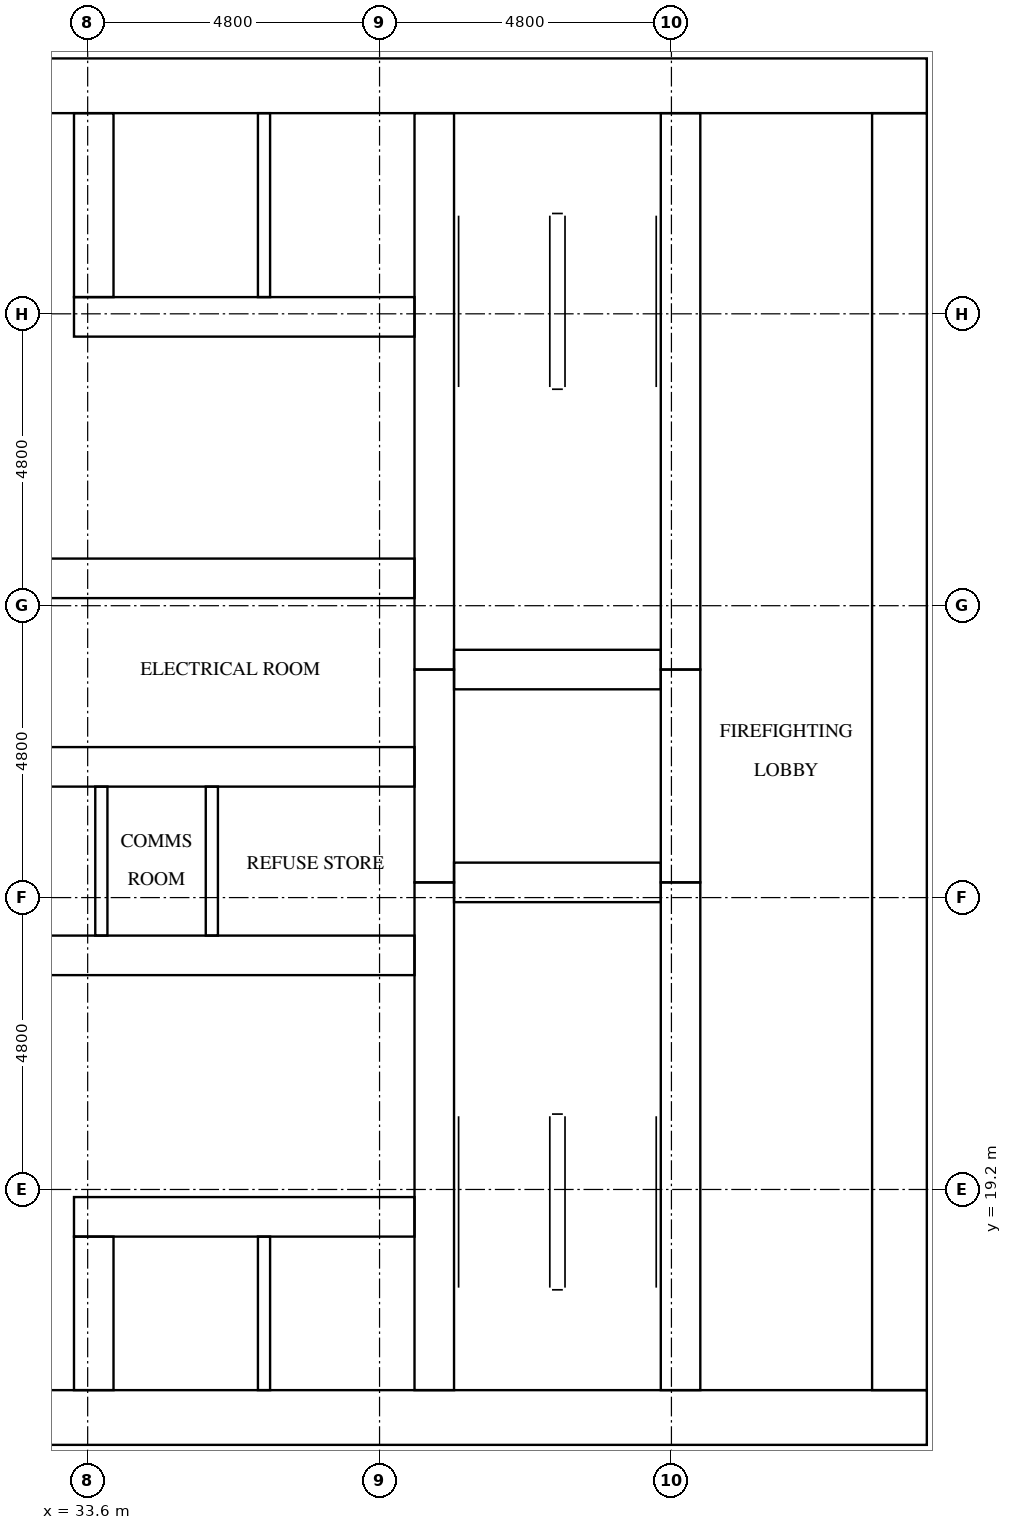
"""IFC4 building model, lengths in metres.
Left out: names, types, materials, properties, quantities, classifications, styles, units other than length and angle.
Written with IfcOpenShell. Run it as: python <this file> out.ifc"""

import sys

from ifc_helpers import new_model, si_unit, direction, frame, frame_2d, origin, place, context, subcontext, project, spatial, rectangle, extrude, element, fill, save


model = new_model("IFC4")
c1 = context("Model", 3, precision=1e-05, world=origin(), true_north=direction((0.0, 1.0)))
c2 = subcontext(c1, "Body", "Model", "MODEL_VIEW")
j1 = project(units=[si_unit("LENGTHUNIT", "METRE"), si_unit("PLANEANGLEUNIT", "RADIAN")], contexts=[c1])
p1 = place(None, origin())
s1 = spatial("IfcSite", under=j1, at=p1, CompositionType="ELEMENT")
p2 = place(p1, origin())
s2 = spatial("IfcBuilding", under=s1, at=p2, CompositionType="ELEMENT")
p3 = place(p2, frame((0.0, 0.0, 76.8)))
s3 = spatial("IfcBuildingStorey", under=s2, at=p3, CompositionType="ELEMENT", Elevation=76.8)
p4 = place(p3, frame((15.0, 15.45, 0.0), z_axis=(0.0, 0.0, 1.0), x_axis=(1.0, 0.0, 0.0)))
e1 = element("IfcWall", 1, at=p4, inside=s3, PredefinedType="SHEAR", context=c2, shape_type="SweptSolid", body=[
    extrude(rectangle(XDim=32.4, YDim=0.9, at=frame_2d((16.2, 0.0))), origin(), (0.0, 0.0, 1.0), 3.2),
])
p5 = place(p4, frame((15.3, 0.0, 0.0)))
e2 = element("IfcOpeningElement", 2, at=p5, cuts=e1, PredefinedType="OPENING", context=c2, shape_type="SweptSolid", body=[
    extrude(rectangle(XDim=1.8, YDim=2.1, at=frame_2d((0.9, 1.05))), frame((0.0, 0.46, 0.0), z_axis=(0.0, -1.0, 0.0), x_axis=(1.0, 0.0, 0.0)), (0.0, 0.0, 1.0), 0.92),
])
p6 = place(p3, frame((15.0, 37.35, 0.0), z_axis=(0.0, 0.0, 1.0), x_axis=(1.0, 0.0, 0.0)))
e3 = element("IfcWall", 3, at=p6, inside=s3, PredefinedType="SHEAR", context=c2, shape_type="SweptSolid", body=[
    extrude(rectangle(XDim=32.4, YDim=0.9, at=frame_2d((16.2, 0.0))), origin(), (0.0, 0.0, 1.0), 3.2),
])
p7 = place(p6, frame((15.3, 0.0, 0.0)))
e4 = element("IfcOpeningElement", 4, at=p7, cuts=e3, PredefinedType="OPENING", context=c2, shape_type="SweptSolid", body=[
    extrude(rectangle(XDim=1.8, YDim=2.1, at=frame_2d((0.9, 1.05))), frame((0.0, 0.46, 0.0), z_axis=(0.0, -1.0, 0.0), x_axis=(1.0, 0.0, 0.0)), (0.0, 0.0, 1.0), 0.92),
])
p8 = place(p6, frame((1.794, 0.0, 0.0)))
e5 = element("IfcOpeningElement", 5, at=p8, cuts=e3, PredefinedType="OPENING", context=c2, shape_type="SweptSolid", body=[
    extrude(rectangle(XDim=1.0, YDim=2.1, at=frame_2d((0.5, 1.05))), frame((0.0, 0.46, 0.0), z_axis=(0.0, -1.0, 0.0), x_axis=(1.0, 0.0, 0.0)), (0.0, 0.0, 1.0), 0.92),
])
p9 = place(p6, frame((5.331, 0.0, 0.0)))
e6 = element("IfcOpeningElement", 6, at=p9, cuts=e3, PredefinedType="OPENING", context=c2, shape_type="SweptSolid", body=[
    extrude(rectangle(XDim=1.0, YDim=2.1, at=frame_2d((0.5, 1.05))), frame((0.0, 0.46, 0.0), z_axis=(0.0, -1.0, 0.0), x_axis=(1.0, 0.0, 0.0)), (0.0, 0.0, 1.0), 0.92),
])
p10 = place(p3, frame((46.95, 15.9, 0.0), z_axis=(0.0, 0.0, 1.0), x_axis=(0.0, 1.0, 0.0)))
e7 = element("IfcWall", 7, at=p10, inside=s3, PredefinedType="SHEAR", context=c2, shape_type="SweptSolid", body=[
    extrude(rectangle(XDim=21.0, YDim=0.9, at=frame_2d((10.5, 0.0))), origin(), (0.0, 0.0, 1.0), 3.2),
])
p11 = place(p10, frame((10.2, 0.0, 0.0)))
e8 = element("IfcOpeningElement", 8, at=p11, cuts=e7, PredefinedType="OPENING", context=c2, shape_type="SweptSolid", body=[
    extrude(rectangle(XDim=1.2, YDim=2.1, at=frame_2d((0.6, 1.05))), frame((0.0, 0.46, 0.0), z_axis=(0.0, -1.0, 0.0), x_axis=(1.0, 0.0, 0.0)), (0.0, 0.0, 1.0), 0.92),
])
p12 = place(p3, frame((39.3, 15.9, 0.0), z_axis=(0.0, 0.0, 1.0), x_axis=(0.0, 1.0, 0.0)))
e9 = element("IfcWall", 9, at=p12, inside=s3, PredefinedType="SHEAR", context=c2, shape_type="SweptSolid", body=[
    extrude(rectangle(XDim=8.35, YDim=0.65, at=frame_2d((4.175, 0.0))), origin(), (0.0, 0.0, 1.0), 3.2),
])
p13 = place(p3, frame((39.3, 24.25, 0.0), z_axis=(0.0, 0.0, 1.0), x_axis=(0.0, 1.0, 0.0)))
e10 = element("IfcWall", 10, at=p13, inside=s3, PredefinedType="SHEAR", context=c2, shape_type="SweptSolid", body=[
    extrude(rectangle(XDim=3.5, YDim=0.65, at=frame_2d((1.75, 0.0))), origin(), (0.0, 0.0, 1.0), 3.2),
])
p14 = place(p3, frame((39.3, 27.75, 0.0), z_axis=(0.0, 0.0, 1.0), x_axis=(0.0, 1.0, 0.0)))
e11 = element("IfcWall", 11, at=p14, inside=s3, PredefinedType="SHEAR", context=c2, shape_type="SweptSolid", body=[
    extrude(rectangle(XDim=9.15, YDim=0.65, at=frame_2d((4.575, 0.0))), origin(), (0.0, 0.0, 1.0), 3.2),
])
p15 = place(p3, frame((43.35, 15.9, 0.0), z_axis=(0.0, 0.0, 1.0), x_axis=(0.0, 1.0, 0.0)))
e12 = element("IfcWall", 12, at=p15, inside=s3, PredefinedType="SHEAR", context=c2, shape_type="SweptSolid", body=[
    extrude(rectangle(XDim=8.35, YDim=0.65, at=frame_2d((4.175, 0.0))), origin(), (0.0, 0.0, 1.0), 3.2),
])
p16 = place(p15, frame((0.3, 0.0, 0.0)))
e13 = element("IfcOpeningElement", 13, at=p16, cuts=e12, PredefinedType="OPENING", context=c2, shape_type="SweptSolid", body=[
    extrude(rectangle(XDim=1.2, YDim=2.1, at=frame_2d((0.6, 1.05))), frame((0.0, 0.335, 0.0), z_axis=(0.0, -1.0, 0.0), x_axis=(1.0, 0.0, 0.0)), (0.0, 0.0, 1.0), 0.67),
])
p17 = place(p3, frame((43.35, 24.25, 0.0), z_axis=(0.0, 0.0, 1.0), x_axis=(0.0, 1.0, 0.0)))
e14 = element("IfcWall", 14, at=p17, inside=s3, PredefinedType="SHEAR", context=c2, shape_type="SweptSolid", body=[
    extrude(rectangle(XDim=3.5, YDim=0.65, at=frame_2d((1.75, 0.0))), origin(), (0.0, 0.0, 1.0), 3.2),
])
p18 = place(p17, frame((1.2, 0.0, 0.0)))
e15 = element("IfcOpeningElement", 15, at=p18, cuts=e14, PredefinedType="OPENING", context=c2, shape_type="SweptSolid", body=[
    extrude(rectangle(XDim=1.1, YDim=2.1, at=frame_2d((0.55, 1.05))), frame((0.0, 0.335, 0.0), z_axis=(0.0, -1.0, 0.0), x_axis=(1.0, 0.0, 0.0)), (0.0, 0.0, 1.0), 0.67),
])
p19 = place(p3, frame((43.35, 27.75, 0.0), z_axis=(0.0, 0.0, 1.0), x_axis=(0.0, 1.0, 0.0)))
e16 = element("IfcWall", 16, at=p19, inside=s3, PredefinedType="SHEAR", context=c2, shape_type="SweptSolid", body=[
    extrude(rectangle(XDim=9.15, YDim=0.65, at=frame_2d((4.575, 0.0))), origin(), (0.0, 0.0, 1.0), 3.2),
])
p20 = place(p19, frame((7.65, 0.0, 0.0)))
e17 = element("IfcOpeningElement", 17, at=p20, cuts=e16, PredefinedType="OPENING", context=c2, shape_type="SweptSolid", body=[
    extrude(rectangle(XDim=1.2, YDim=2.1, at=frame_2d((0.6, 1.05))), frame((0.0, 0.335, 0.0), z_axis=(0.0, -1.0, 0.0), x_axis=(1.0, 0.0, 0.0)), (0.0, 0.0, 1.0), 0.67),
])
for number, where, z_axis, x_axis in (
    (18, (39.625, 24.25, 0.0), (0.0, 0.0, 1.0), (1.0, 0.0, 0.0)),
    (19, (39.625, 27.75, 0.0), (0.0, 0.0, 1.0), (1.0, 0.0, 0.0)),
):
    element("IfcWall", number, at=place(p3, frame(where, z_axis=z_axis, x_axis=x_axis)), inside=s3, PredefinedType="SHEAR", context=c2, shape_type="SweptSolid", body=[
        extrude(rectangle(XDim=3.4, YDim=0.65, at=frame_2d((1.7, 0.0))), origin(), (0.0, 0.0, 1.0), 3.2),
    ])
p21 = place(p3, frame((33.375, 18.75, 0.0), z_axis=(0.0, 0.0, 1.0), x_axis=(1.0, 0.0, 0.0)))
e20 = element("IfcWall", 20, at=p21, inside=s3, PredefinedType="SHEAR", context=c2, shape_type="SweptSolid", body=[
    extrude(rectangle(XDim=5.6, YDim=0.65, at=frame_2d((2.8, 0.0))), origin(), (0.0, 0.0, 1.0), 3.2),
])
p22 = place(p21, frame((1.288, 0.0, 0.0)))
e21 = element("IfcOpeningElement", 21, at=p22, cuts=e20, PredefinedType="OPENING", context=c2, shape_type="SweptSolid", body=[
    extrude(rectangle(XDim=1.1, YDim=2.1, at=frame_2d((0.55, 1.05))), frame((0.0, 0.335, 0.0), z_axis=(0.0, -1.0, 0.0), x_axis=(1.0, 0.0, 0.0)), (0.0, 0.0, 1.0), 0.67),
])
p23 = place(p21, frame((3.863, 0.0, 0.0)))
e22 = element("IfcOpeningElement", 22, at=p23, cuts=e20, PredefinedType="OPENING", context=c2, shape_type="SweptSolid", body=[
    extrude(rectangle(XDim=1.1, YDim=2.1, at=frame_2d((0.55, 1.05))), frame((0.0, 0.335, 0.0), z_axis=(0.0, -1.0, 0.0), x_axis=(1.0, 0.0, 0.0)), (0.0, 0.0, 1.0), 0.67),
])
p24 = place(p3, frame((23.425, 23.05, 0.0), z_axis=(0.0, 0.0, 1.0), x_axis=(1.0, 0.0, 0.0)))
e23 = element("IfcWall", 23, at=p24, inside=s3, PredefinedType="SHEAR", context=c2, shape_type="SweptSolid", body=[
    extrude(rectangle(XDim=15.55, YDim=0.65, at=frame_2d((7.775, 0.0))), origin(), (0.0, 0.0, 1.0), 3.2),
])
p25 = place(p24, frame((0.663, 0.0, 0.0)))
e24 = element("IfcOpeningElement", 24, at=p25, cuts=e23, PredefinedType="OPENING", context=c2, shape_type="SweptSolid", body=[
    extrude(rectangle(XDim=1.1, YDim=2.1, at=frame_2d((0.55, 1.05))), frame((0.0, 0.335, 0.0), z_axis=(0.0, -1.0, 0.0), x_axis=(1.0, 0.0, 0.0)), (0.0, 0.0, 1.0), 0.67),
])
p26 = place(p24, frame((3.288, 0.0, 0.0)))
e25 = element("IfcOpeningElement", 25, at=p26, cuts=e23, PredefinedType="OPENING", context=c2, shape_type="SweptSolid", body=[
    extrude(rectangle(XDim=1.1, YDim=2.1, at=frame_2d((0.55, 1.05))), frame((0.0, 0.335, 0.0), z_axis=(0.0, -1.0, 0.0), x_axis=(1.0, 0.0, 0.0)), (0.0, 0.0, 1.0), 0.67),
])
p27 = place(p24, frame((10.809, 0.0, 0.0)))
e26 = element("IfcOpeningElement", 26, at=p27, cuts=e23, PredefinedType="OPENING", context=c2, shape_type="SweptSolid", body=[
    extrude(rectangle(XDim=1.0, YDim=2.1, at=frame_2d((0.5, 1.05))), frame((0.0, 0.335, 0.0), z_axis=(0.0, -1.0, 0.0), x_axis=(1.0, 0.0, 0.0)), (0.0, 0.0, 1.0), 0.67),
])
p28 = place(p24, frame((13.434, 0.0, 0.0)))
e27 = element("IfcOpeningElement", 27, at=p28, cuts=e23, PredefinedType="OPENING", context=c2, shape_type="SweptSolid", body=[
    extrude(rectangle(XDim=1.0, YDim=2.1, at=frame_2d((0.5, 1.05))), frame((0.0, 0.335, 0.0), z_axis=(0.0, -1.0, 0.0), x_axis=(1.0, 0.0, 0.0)), (0.0, 0.0, 1.0), 0.67),
])
p29 = place(p3, frame((23.425, 26.15, 0.0), z_axis=(0.0, 0.0, 1.0), x_axis=(1.0, 0.0, 0.0)))
e28 = element("IfcWall", 28, at=p29, inside=s3, PredefinedType="SHEAR", context=c2, shape_type="SweptSolid", body=[
    extrude(rectangle(XDim=15.55, YDim=0.65, at=frame_2d((7.775, 0.0))), origin(), (0.0, 0.0, 1.0), 3.2),
])
p30 = place(p3, frame((23.425, 29.25, 0.0), z_axis=(0.0, 0.0, 1.0), x_axis=(1.0, 0.0, 0.0)))
e29 = element("IfcWall", 29, at=p30, inside=s3, PredefinedType="SHEAR", context=c2, shape_type="SweptSolid", body=[
    extrude(rectangle(XDim=15.55, YDim=0.65, at=frame_2d((7.775, 0.0))), origin(), (0.0, 0.0, 1.0), 3.2),
])
p31 = place(p30, frame((2.508, 0.0, 0.0)))
e30 = element("IfcOpeningElement", 30, at=p31, cuts=e29, PredefinedType="OPENING", context=c2, shape_type="SweptSolid", body=[
    extrude(rectangle(XDim=1.0, YDim=2.1, at=frame_2d((0.5, 1.05))), frame((0.0, 0.335, 0.0), z_axis=(0.0, -1.0, 0.0), x_axis=(1.0, 0.0, 0.0)), (0.0, 0.0, 1.0), 0.67),
])
p32 = place(p30, frame((7.275, 0.0, 0.0)))
e31 = element("IfcOpeningElement", 31, at=p32, cuts=e29, PredefinedType="OPENING", context=c2, shape_type="SweptSolid", body=[
    extrude(rectangle(XDim=1.0, YDim=2.1, at=frame_2d((0.5, 1.05))), frame((0.0, 0.335, 0.0), z_axis=(0.0, -1.0, 0.0), x_axis=(1.0, 0.0, 0.0)), (0.0, 0.0, 1.0), 0.67),
])
p33 = place(p30, frame((12.042, 0.0, 0.0)))
e32 = element("IfcOpeningElement", 32, at=p33, cuts=e29, PredefinedType="OPENING", context=c2, shape_type="SweptSolid", body=[
    extrude(rectangle(XDim=1.0, YDim=2.1, at=frame_2d((0.5, 1.05))), frame((0.0, 0.335, 0.0), z_axis=(0.0, -1.0, 0.0), x_axis=(1.0, 0.0, 0.0)), (0.0, 0.0, 1.0), 0.67),
])
p34 = place(p3, frame((33.375, 33.55, 0.0), z_axis=(0.0, 0.0, 1.0), x_axis=(1.0, 0.0, 0.0)))
e33 = element("IfcWall", 33, at=p34, inside=s3, PredefinedType="SHEAR", context=c2, shape_type="SweptSolid", body=[
    extrude(rectangle(XDim=5.6, YDim=0.65, at=frame_2d((2.8, 0.0))), origin(), (0.0, 0.0, 1.0), 3.2),
])
p35 = place(p3, frame((33.7, 15.9, 0.0), z_axis=(0.0, 0.0, 1.0), x_axis=(0.0, 1.0, 0.0)))
e34 = element("IfcWall", 34, at=p35, inside=s3, PredefinedType="SHEAR", context=c2, shape_type="SweptSolid", body=[
    extrude(rectangle(XDim=2.525, YDim=0.65, at=frame_2d((1.263, 0.0))), origin(), (0.0, 0.0, 1.0), 3.2),
])
p36 = place(p3, frame((33.7, 33.875, 0.0), z_axis=(0.0, 0.0, 1.0), x_axis=(0.0, 1.0, 0.0)))
e35 = element("IfcWall", 35, at=p36, inside=s3, PredefinedType="SHEAR", context=c2, shape_type="SweptSolid", body=[
    extrude(rectangle(XDim=3.025, YDim=0.65, at=frame_2d((1.512, 0.0))), origin(), (0.0, 0.0, 1.0), 3.2),
])
p37 = place(p3, frame((33.825, 23.375, 0.0), z_axis=(0.0, 0.0, 1.0), x_axis=(0.0, 1.0, 0.0)))
e36 = element("IfcWall", 36, at=p37, inside=s3, PredefinedType="SOLIDWALL", context=c2, shape_type="SweptSolid", body=[
    extrude(rectangle(XDim=2.45, YDim=0.2, at=frame_2d((1.225, 0.0))), origin(), (0.0, 0.0, 1.0), 3.2),
])
p38 = place(p3, frame((36.5, 15.9, 0.0), z_axis=(0.0, 0.0, 1.0), x_axis=(0.0, 1.0, 0.0)))
e37 = element("IfcWall", 37, at=p38, inside=s3, PredefinedType="SOLIDWALL", context=c2, shape_type="SweptSolid", body=[
    extrude(rectangle(XDim=2.525, YDim=0.2, at=frame_2d((1.263, 0.0))), origin(), (0.0, 0.0, 1.0), 3.2),
])
p39 = place(p3, frame((36.5, 33.875, 0.0), z_axis=(0.0, 0.0, 1.0), x_axis=(0.0, 1.0, 0.0)))
e38 = element("IfcWall", 38, at=p39, inside=s3, PredefinedType="SOLIDWALL", context=c2, shape_type="SweptSolid", body=[
    extrude(rectangle(XDim=3.025, YDim=0.2, at=frame_2d((1.512, 0.0))), origin(), (0.0, 0.0, 1.0), 3.2),
])
p40 = place(p3, frame((35.642, 23.375, 0.0), z_axis=(0.0, 0.0, 1.0), x_axis=(0.0, 1.0, 0.0)))
e39 = element("IfcWall", 39, at=p40, inside=s3, PredefinedType="PARTITIONING", context=c2, shape_type="SweptSolid", body=[
    extrude(rectangle(XDim=2.45, YDim=0.2, at=frame_2d((1.225, 0.0))), origin(), (0.0, 0.0, 1.0), 3.2),
])
p41 = place(p22, origin())
e40 = element("IfcDoor", 40, at=p41, inside=s3, OperationType="DOUBLE_DOOR_SLIDING", PredefinedType="DOOR", context=c2, shape_type="SweptSolid", body=[
    extrude(rectangle(XDim=1.1, YDim=2.1, at=frame_2d((0.55, 1.05))), frame((0.0, 0.025, 0.0), z_axis=(0.0, -1.0, 0.0), x_axis=(1.0, 0.0, 0.0)), (0.0, 0.0, 1.0), 0.05),
])
fill(e21, e40)
p42 = place(p23, origin())
e41 = element("IfcDoor", 41, at=p42, inside=s3, OperationType="DOUBLE_DOOR_SLIDING", PredefinedType="DOOR", context=c2, shape_type="SweptSolid", body=[
    extrude(rectangle(XDim=1.1, YDim=2.1, at=frame_2d((0.55, 1.05))), frame((0.0, 0.025, 0.0), z_axis=(0.0, -1.0, 0.0), x_axis=(1.0, 0.0, 0.0)), (0.0, 0.0, 1.0), 0.05),
])
fill(e22, e41)
p43 = place(p18, origin())
e42 = element("IfcDoor", 42, at=p43, inside=s3, OperationType="DOUBLE_DOOR_SLIDING", PredefinedType="DOOR", context=c2, shape_type="SweptSolid", body=[
    extrude(rectangle(XDim=1.1, YDim=2.1, at=frame_2d((0.55, 1.05))), frame((0.0, 0.025, 0.0), z_axis=(0.0, -1.0, 0.0), x_axis=(1.0, 0.0, 0.0)), (0.0, 0.0, 1.0), 0.05),
])
fill(e15, e42)
p44 = place(p16, origin())
e43 = element("IfcDoor", 43, at=p44, inside=s3, OperationType="SINGLE_SWING_RIGHT", PredefinedType="DOOR", context=c2, shape_type="SweptSolid", body=[
    extrude(rectangle(XDim=1.2, YDim=2.1, at=frame_2d((0.6, 1.05))), frame((0.0, 0.025, 0.0), z_axis=(0.0, -1.0, 0.0), x_axis=(1.0, 0.0, 0.0)), (0.0, 0.0, 1.0), 0.05),
])
fill(e13, e43)
p45 = place(p20, origin())
e44 = element("IfcDoor", 44, at=p45, inside=s3, OperationType="SINGLE_SWING_LEFT", PredefinedType="DOOR", context=c2, shape_type="SweptSolid", body=[
    extrude(rectangle(XDim=1.2, YDim=2.1, at=frame_2d((0.6, 1.05))), frame((0.0, 0.025, 0.0), z_axis=(0.0, -1.0, 0.0), x_axis=(1.0, 0.0, 0.0)), (0.0, 0.0, 1.0), 0.05),
])
fill(e17, e44)
p46 = place(p11, origin())
e45 = element("IfcDoor", 45, at=p46, inside=s3, OperationType="SINGLE_SWING_LEFT", PredefinedType="DOOR", context=c2, shape_type="SweptSolid", body=[
    extrude(rectangle(XDim=1.2, YDim=2.1, at=frame_2d((0.6, 1.05))), frame((0.0, 0.025, 0.0), z_axis=(0.0, -1.0, 0.0), x_axis=(1.0, 0.0, 0.0)), (0.0, 0.0, 1.0), 0.05),
])
fill(e8, e45)
p47 = place(p27, frame((1.0, 0.0, 0.0), z_axis=(0.0, 0.0, 1.0), x_axis=(-1.0, 0.0, 0.0)))
e46 = element("IfcDoor", 46, at=p47, inside=s3, OperationType="SINGLE_SWING_RIGHT", PredefinedType="DOOR", context=c2, shape_type="SweptSolid", body=[
    extrude(rectangle(XDim=1.0, YDim=2.1, at=frame_2d((0.5, 1.05))), frame((0.0, 0.025, 0.0), z_axis=(0.0, -1.0, 0.0), x_axis=(1.0, 0.0, 0.0)), (0.0, 0.0, 1.0), 0.05),
])
fill(e26, e46)
p48 = place(p28, frame((1.0, 0.0, 0.0), z_axis=(0.0, 0.0, 1.0), x_axis=(-1.0, 0.0, 0.0)))
e47 = element("IfcDoor", 47, at=p48, inside=s3, OperationType="SINGLE_SWING_LEFT", PredefinedType="DOOR", context=c2, shape_type="SweptSolid", body=[
    extrude(rectangle(XDim=1.0, YDim=2.1, at=frame_2d((0.5, 1.05))), frame((0.0, 0.025, 0.0), z_axis=(0.0, -1.0, 0.0), x_axis=(1.0, 0.0, 0.0)), (0.0, 0.0, 1.0), 0.05),
])
fill(e27, e47)
p49 = place(p33, origin())
e48 = element("IfcDoor", 48, at=p49, inside=s3, OperationType="SINGLE_SWING_RIGHT", PredefinedType="DOOR", context=c2, shape_type="SweptSolid", body=[
    extrude(rectangle(XDim=1.0, YDim=2.1, at=frame_2d((0.5, 1.05))), frame((0.0, 0.025, 0.0), z_axis=(0.0, -1.0, 0.0), x_axis=(1.0, 0.0, 0.0)), (0.0, 0.0, 1.0), 0.05),
])
fill(e32, e48)
save(model, sys.argv[1])
